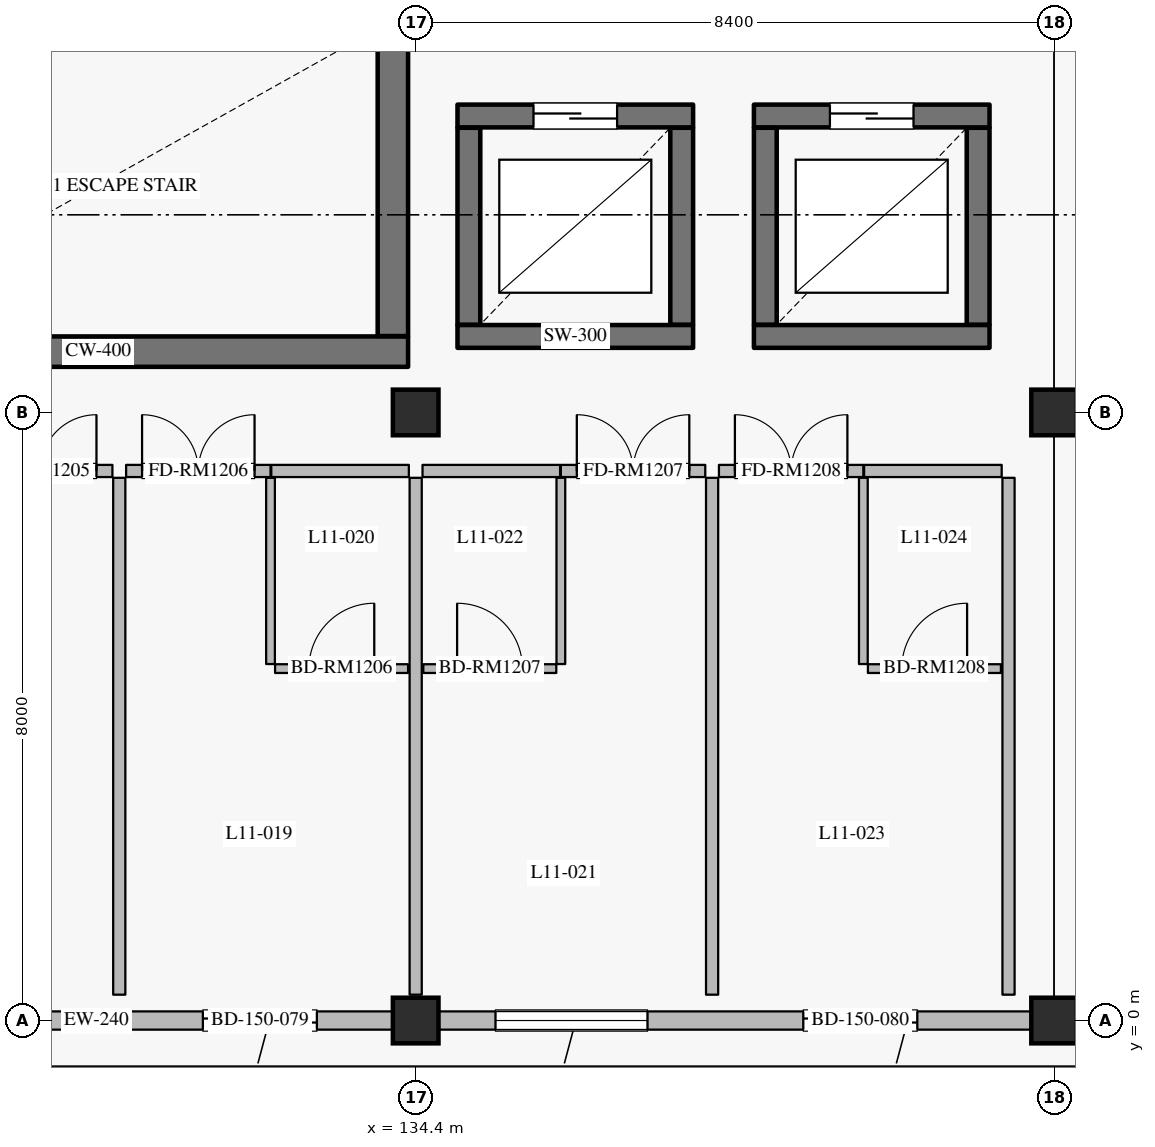
"""IFC4 building model, lengths in metres.
Left out: names, types, materials, properties, quantities, classifications, styles, units other than length and angle.
Written with IfcOpenShell. Run it as: python <this file> out.ifc"""

import sys

from ifc_helpers import new_model, si_unit, direction, frame, frame_2d, origin, origin_2d, place, context, subcontext, project, spatial, rectangle, extrude, element, fill, save


model = new_model("IFC4")
c1 = context("Model", 3, precision=1e-05, world=origin(), true_north=direction((0.0, 1.0)))
c2 = subcontext(c1, "Body", "Model", "MODEL_VIEW")
j1 = project(units=[si_unit("LENGTHUNIT", "METRE"), si_unit("PLANEANGLEUNIT", "RADIAN")], contexts=[c1])
p1 = place(None, origin())
s1 = spatial("IfcSite", under=j1, at=p1, CompositionType="ELEMENT")
p2 = place(p1, origin())
s2 = spatial("IfcBuilding", under=s1, at=p2, CompositionType="ELEMENT")
p3 = place(p2, frame((0.0, 0.0, 47.4)))
s3 = spatial("IfcBuildingStorey", under=s2, at=p3, CompositionType="ELEMENT", Elevation=47.4)
for number, where, z_axis, x_axis in (
    (1, (134.4, 0.0, 0.0), (0.0, 0.0, 1.0), (1.0, 0.0, 0.0)),
    (2, (142.8, 0.0, 0.0), (0.0, 0.0, 1.0), (1.0, 0.0, 0.0)),
    (3, (134.4, 8.0, 0.0), (0.0, 0.0, 1.0), (1.0, 0.0, 0.0)),
    (4, (142.8, 8.0, 0.0), (0.0, 0.0, 1.0), (1.0, 0.0, 0.0)),
):
    element("IfcColumn", number, at=place(p3, frame(where, z_axis=z_axis, x_axis=x_axis)), inside=s3, PredefinedType="COLUMN", context=c2, shape_type="SweptSolid", body=[
        extrude(rectangle(XDim=0.6, YDim=0.6, at=origin_2d()), origin(), (0.0, 0.0, 1.0), 4.2),
    ])
p4 = place(p3, frame((134.1, 0.0, 0.0), z_axis=(0.0, 0.0, 1.0), x_axis=(-1.0, 0.0, 0.0)))
e5 = element("IfcWall", 5, at=p4, inside=s3, PredefinedType="SOLIDWALL", context=c2, shape_type="SweptSolid", body=[
    extrude(rectangle(XDim=7.8, YDim=0.24, at=frame_2d((3.9, 0.0))), origin(), (0.0, 0.0, 1.0), 3.49),
])
p5 = place(p4, frame((1.0, 0.0, 0.0)))
e6 = element("IfcOpeningElement", 6, at=p5, cuts=e5, PredefinedType="OPENING", context=c2, shape_type="SweptSolid", body=[
    extrude(rectangle(XDim=1.5, YDim=2.25, at=frame_2d((0.75, 1.125))), frame((0.0, 0.13, 0.0), z_axis=(0.0, -1.0, 0.0), x_axis=(1.0, 0.0, 0.0)), (0.0, 0.0, 1.0), 0.26),
])
p6 = place(p4, frame((4.55, 0.0, 0.8)))
e7 = element("IfcOpeningElement", 7, at=p6, cuts=e5, PredefinedType="OPENING", context=c2, shape_type="SweptSolid", body=[
    extrude(rectangle(XDim=2.0, YDim=1.75, at=frame_2d((1.0, 0.875))), frame((0.0, 0.13, 0.0), z_axis=(0.0, -1.0, 0.0), x_axis=(1.0, 0.0, 0.0)), (0.0, 0.0, 1.0), 0.26),
])
p7 = place(p3, frame((142.5, 0.0, 0.0), z_axis=(0.0, 0.0, 1.0), x_axis=(-1.0, 0.0, 0.0)))
e8 = element("IfcWall", 8, at=p7, inside=s3, PredefinedType="SOLIDWALL", context=c2, shape_type="SweptSolid", body=[
    extrude(rectangle(XDim=7.8, YDim=0.24, at=frame_2d((3.9, 0.0))), origin(), (0.0, 0.0, 1.0), 3.49),
])
p8 = place(p7, frame((1.5, 0.0, 0.0)))
e9 = element("IfcOpeningElement", 9, at=p8, cuts=e8, PredefinedType="OPENING", context=c2, shape_type="SweptSolid", body=[
    extrude(rectangle(XDim=1.5, YDim=2.25, at=frame_2d((0.75, 1.125))), frame((0.0, 0.13, 0.0), z_axis=(0.0, -1.0, 0.0), x_axis=(1.0, 0.0, 0.0)), (0.0, 0.0, 1.0), 0.26),
])
p9 = place(p7, frame((5.05, 0.0, 0.8)))
e10 = element("IfcOpeningElement", 10, at=p9, cuts=e8, PredefinedType="OPENING", context=c2, shape_type="SweptSolid", body=[
    extrude(rectangle(XDim=2.0, YDim=1.75, at=frame_2d((1.0, 0.875))), frame((0.0, 0.13, 0.0), z_axis=(0.0, -1.0, 0.0), x_axis=(1.0, 0.0, 0.0)), (0.0, 0.0, 1.0), 0.26),
])
p10 = place(p3, frame((134.95, 9.0, 0.0), z_axis=(0.0, 0.0, 1.0), x_axis=(1.0, 0.0, 0.0)))
e11 = element("IfcWall", 11, at=p10, inside=s3, PredefinedType="SHEAR", context=c2, shape_type="SweptSolid", body=[
    extrude(rectangle(XDim=3.1, YDim=0.3, at=frame_2d((1.55, 0.0))), origin(), (0.0, 0.0, 1.0), 3.935),
])
p11 = place(p3, frame((137.9, 9.155, 0.0), z_axis=(0.0, 0.0, 1.0), x_axis=(0.0, 1.0, 0.0)))
e12 = element("IfcWall", 12, at=p11, inside=s3, PredefinedType="SHEAR", context=c2, shape_type="SweptSolid", body=[
    extrude(rectangle(XDim=2.59, YDim=0.3, at=frame_2d((1.295, 0.0))), origin(), (0.0, 0.0, 1.0), 3.935),
])
p12 = place(p3, frame((138.05, 11.9, 0.0), z_axis=(0.0, 0.0, 1.0), x_axis=(-1.0, 0.0, 0.0)))
e13 = element("IfcWall", 13, at=p12, inside=s3, PredefinedType="SHEAR", context=c2, shape_type="SweptSolid", body=[
    extrude(rectangle(XDim=3.1, YDim=0.3, at=frame_2d((1.55, 0.0))), origin(), (0.0, 0.0, 1.0), 3.935),
])
p13 = place(p12, frame((1.0, 0.0, 0.0)))
e14 = element("IfcOpeningElement", 14, at=p13, cuts=e13, PredefinedType="OPENING", context=c2, shape_type="SweptSolid", body=[
    extrude(rectangle(XDim=1.1, YDim=2.2, at=frame_2d((0.55, 1.1))), frame((0.0, 0.16, 0.0), z_axis=(0.0, -1.0, 0.0), x_axis=(1.0, 0.0, 0.0)), (0.0, 0.0, 1.0), 0.32),
])
p14 = place(p3, frame((135.1, 11.745, 0.0), z_axis=(0.0, 0.0, 1.0), x_axis=(0.0, -1.0, 0.0)))
e15 = element("IfcWall", 15, at=p14, inside=s3, PredefinedType="SHEAR", context=c2, shape_type="SweptSolid", body=[
    extrude(rectangle(XDim=2.59, YDim=0.3, at=frame_2d((1.295, 0.0))), origin(), (0.0, 0.0, 1.0), 3.935),
])
p15 = place(p3, frame((138.85, 9.0, 0.0), z_axis=(0.0, 0.0, 1.0), x_axis=(1.0, 0.0, 0.0)))
e16 = element("IfcWall", 16, at=p15, inside=s3, PredefinedType="SHEAR", context=c2, shape_type="SweptSolid", body=[
    extrude(rectangle(XDim=3.1, YDim=0.3, at=frame_2d((1.55, 0.0))), origin(), (0.0, 0.0, 1.0), 3.935),
])
p16 = place(p3, frame((141.8, 9.155, 0.0), z_axis=(0.0, 0.0, 1.0), x_axis=(0.0, 1.0, 0.0)))
e17 = element("IfcWall", 17, at=p16, inside=s3, PredefinedType="SHEAR", context=c2, shape_type="SweptSolid", body=[
    extrude(rectangle(XDim=2.59, YDim=0.3, at=frame_2d((1.295, 0.0))), origin(), (0.0, 0.0, 1.0), 3.935),
])
p17 = place(p3, frame((141.95, 11.9, 0.0), z_axis=(0.0, 0.0, 1.0), x_axis=(-1.0, 0.0, 0.0)))
e18 = element("IfcWall", 18, at=p17, inside=s3, PredefinedType="SHEAR", context=c2, shape_type="SweptSolid", body=[
    extrude(rectangle(XDim=3.1, YDim=0.3, at=frame_2d((1.55, 0.0))), origin(), (0.0, 0.0, 1.0), 3.935),
])
p18 = place(p17, frame((1.0, 0.0, 0.0)))
e19 = element("IfcOpeningElement", 19, at=p18, cuts=e18, PredefinedType="OPENING", context=c2, shape_type="SweptSolid", body=[
    extrude(rectangle(XDim=1.1, YDim=2.2, at=frame_2d((0.55, 1.1))), frame((0.0, 0.16, 0.0), z_axis=(0.0, -1.0, 0.0), x_axis=(1.0, 0.0, 0.0)), (0.0, 0.0, 1.0), 0.32),
])
p19 = place(p3, frame((139.0, 11.745, 0.0), z_axis=(0.0, 0.0, 1.0), x_axis=(0.0, -1.0, 0.0)))
e20 = element("IfcWall", 20, at=p19, inside=s3, PredefinedType="SHEAR", context=c2, shape_type="SweptSolid", body=[
    extrude(rectangle(XDim=2.59, YDim=0.3, at=frame_2d((1.295, 0.0))), origin(), (0.0, 0.0, 1.0), 3.935),
])
p20 = place(p3, frame((126.15, 8.8, 0.0), z_axis=(0.0, 0.0, 1.0), x_axis=(1.0, 0.0, 0.0)))
e21 = element("IfcWall", 21, at=p20, inside=s3, PredefinedType="SHEAR", context=c2, shape_type="SweptSolid", body=[
    extrude(rectangle(XDim=8.15, YDim=0.4, at=frame_2d((4.075, 0.0))), origin(), (0.0, 0.0, 1.0), 3.935),
])
p21 = place(p3, frame((134.1, 9.005, 0.0), z_axis=(0.0, 0.0, 1.0), x_axis=(0.0, 1.0, 0.0)))
e22 = element("IfcWall", 22, at=p21, inside=s3, PredefinedType="SHEAR", context=c2, shape_type="SweptSolid", body=[
    extrude(rectangle(XDim=3.95, YDim=0.4, at=frame_2d((1.975, 0.0))), origin(), (0.0, 0.0, 1.0), 3.935),
])
p22 = place(p3, frame((128.51, 7.23, 0.0), z_axis=(0.0, 0.0, 1.0), x_axis=(1.0, 0.0, 0.0)))
e23 = element("IfcWall", 23, at=p22, inside=s3, PredefinedType="PARTITIONING", context=c2, shape_type="SweptSolid", body=[
    extrude(rectangle(XDim=1.9, YDim=0.16, at=frame_2d((0.95, 0.0))), origin(), (0.0, 0.0, 1.0), 3.935),
])
p23 = place(p22, frame((0.21, 0.0, 0.0)))
e24 = element("IfcOpeningElement", 24, at=p23, cuts=e23, PredefinedType="OPENING", context=c2, shape_type="SweptSolid", body=[
    extrude(rectangle(XDim=1.48, YDim=2.35, at=frame_2d((0.74, 1.175))), frame((0.0, 0.09, 0.0), z_axis=(0.0, -1.0, 0.0), x_axis=(1.0, 0.0, 0.0)), (0.0, 0.0, 1.0), 0.18),
])
p24 = place(p3, frame((130.59, 7.23, 0.0), z_axis=(0.0, 0.0, 1.0), x_axis=(1.0, 0.0, 0.0)))
e25 = element("IfcWall", 25, at=p24, inside=s3, PredefinedType="PARTITIONING", context=c2, shape_type="SweptSolid", body=[
    extrude(rectangle(XDim=1.9, YDim=0.16, at=frame_2d((0.95, 0.0))), origin(), (0.0, 0.0, 1.0), 3.935),
])
p25 = place(p24, frame((0.21, 0.0, 0.0)))
e26 = element("IfcOpeningElement", 26, at=p25, cuts=e25, PredefinedType="OPENING", context=c2, shape_type="SweptSolid", body=[
    extrude(rectangle(XDim=1.48, YDim=2.35, at=frame_2d((0.74, 1.175))), frame((0.0, 0.09, 0.0), z_axis=(0.0, -1.0, 0.0), x_axis=(1.0, 0.0, 0.0)), (0.0, 0.0, 1.0), 0.18),
])
p26 = place(p3, frame((132.5, 7.23, 0.0), z_axis=(0.0, 0.0, 1.0), x_axis=(1.0, 0.0, 0.0)))
e27 = element("IfcWall", 27, at=p26, inside=s3, PredefinedType="PARTITIONING", context=c2, shape_type="SweptSolid", body=[
    extrude(rectangle(XDim=1.81, YDim=0.16, at=frame_2d((0.905, 0.0))), origin(), (0.0, 0.0, 1.0), 3.935),
])
p27 = place(p3, frame((132.49, 4.69, 0.0), z_axis=(0.0, 0.0, 1.0), x_axis=(0.0, 1.0, 0.0)))
e28 = element("IfcWall", 28, at=p27, inside=s3, PredefinedType="PARTITIONING", context=c2, shape_type="SweptSolid", body=[
    extrude(rectangle(XDim=2.45, YDim=0.115, at=frame_2d((1.225, 0.0))), origin(), (0.0, 0.0, 1.0), 3.935),
])
p28 = place(p3, frame((132.55, 4.63, 0.0), z_axis=(0.0, 0.0, 1.0), x_axis=(1.0, 0.0, 0.0)))
e29 = element("IfcWall", 29, at=p28, inside=s3, PredefinedType="PARTITIONING", context=c2, shape_type="SweptSolid", body=[
    extrude(rectangle(XDim=1.75, YDim=0.115, at=frame_2d((0.875, 0.0))), origin(), (0.0, 0.0, 1.0), 3.935),
])
p29 = place(p28, frame((0.445, 0.0, 0.0)))
e30 = element("IfcOpeningElement", 30, at=p29, cuts=e29, PredefinedType="OPENING", context=c2, shape_type="SweptSolid", body=[
    extrude(rectangle(XDim=0.86, YDim=2.12, at=frame_2d((0.43, 1.06))), frame((0.0, 0.067, 0.0), z_axis=(0.0, -1.0, 0.0), x_axis=(1.0, 0.0, 0.0)), (0.0, 0.0, 1.0), 0.135),
])
p30 = place(p3, frame((130.5, 0.34, 0.0), z_axis=(0.0, 0.0, 1.0), x_axis=(0.0, 1.0, 0.0)))
e31 = element("IfcWall", 31, at=p30, inside=s3, PredefinedType="PARTITIONING", context=c2, shape_type="SweptSolid", body=[
    extrude(rectangle(XDim=6.8, YDim=0.16, at=frame_2d((3.4, 0.0))), origin(), (0.0, 0.0, 1.0), 3.935),
])
p31 = place(p3, frame((134.49, 7.23, 0.0), z_axis=(0.0, 0.0, 1.0), x_axis=(1.0, 0.0, 0.0)))
e32 = element("IfcWall", 32, at=p31, inside=s3, PredefinedType="PARTITIONING", context=c2, shape_type="SweptSolid", body=[
    extrude(rectangle(XDim=1.81, YDim=0.16, at=frame_2d((0.905, 0.0))), origin(), (0.0, 0.0, 1.0), 3.935),
])
p32 = place(p3, frame((136.31, 7.23, 0.0), z_axis=(0.0, 0.0, 1.0), x_axis=(1.0, 0.0, 0.0)))
e33 = element("IfcWall", 33, at=p32, inside=s3, PredefinedType="PARTITIONING", context=c2, shape_type="SweptSolid", body=[
    extrude(rectangle(XDim=1.9, YDim=0.16, at=frame_2d((0.95, 0.0))), origin(), (0.0, 0.0, 1.0), 3.935),
])
p33 = place(p32, frame((0.21, 0.0, 0.0)))
e34 = element("IfcOpeningElement", 34, at=p33, cuts=e33, PredefinedType="OPENING", context=c2, shape_type="SweptSolid", body=[
    extrude(rectangle(XDim=1.48, YDim=2.35, at=frame_2d((0.74, 1.175))), frame((0.0, 0.09, 0.0), z_axis=(0.0, -1.0, 0.0), x_axis=(1.0, 0.0, 0.0)), (0.0, 0.0, 1.0), 0.18),
])
p34 = place(p3, frame((136.31, 4.69, 0.0), z_axis=(0.0, 0.0, 1.0), x_axis=(0.0, 1.0, 0.0)))
e35 = element("IfcWall", 35, at=p34, inside=s3, PredefinedType="PARTITIONING", context=c2, shape_type="SweptSolid", body=[
    extrude(rectangle(XDim=2.45, YDim=0.115, at=frame_2d((1.225, 0.0))), origin(), (0.0, 0.0, 1.0), 3.935),
])
p35 = place(p3, frame((134.5, 4.63, 0.0), z_axis=(0.0, 0.0, 1.0), x_axis=(1.0, 0.0, 0.0)))
e36 = element("IfcWall", 36, at=p35, inside=s3, PredefinedType="PARTITIONING", context=c2, shape_type="SweptSolid", body=[
    extrude(rectangle(XDim=1.75, YDim=0.115, at=frame_2d((0.875, 0.0))), origin(), (0.0, 0.0, 1.0), 3.935),
])
p36 = place(p35, frame((0.445, 0.0, 0.0)))
e37 = element("IfcOpeningElement", 37, at=p36, cuts=e36, PredefinedType="OPENING", context=c2, shape_type="SweptSolid", body=[
    extrude(rectangle(XDim=0.86, YDim=2.12, at=frame_2d((0.43, 1.06))), frame((0.0, 0.067, 0.0), z_axis=(0.0, -1.0, 0.0), x_axis=(1.0, 0.0, 0.0)), (0.0, 0.0, 1.0), 0.135),
])
p37 = place(p3, frame((134.4, 0.34, 0.0), z_axis=(0.0, 0.0, 1.0), x_axis=(0.0, 1.0, 0.0)))
e38 = element("IfcWall", 38, at=p37, inside=s3, PredefinedType="PARTITIONING", context=c2, shape_type="SweptSolid", body=[
    extrude(rectangle(XDim=6.8, YDim=0.16, at=frame_2d((3.4, 0.0))), origin(), (0.0, 0.0, 1.0), 3.29),
])
p38 = place(p3, frame((138.39, 7.23, 0.0), z_axis=(0.0, 0.0, 1.0), x_axis=(1.0, 0.0, 0.0)))
e39 = element("IfcWall", 39, at=p38, inside=s3, PredefinedType="PARTITIONING", context=c2, shape_type="SweptSolid", body=[
    extrude(rectangle(XDim=1.9, YDim=0.16, at=frame_2d((0.95, 0.0))), origin(), (0.0, 0.0, 1.0), 3.935),
])
p39 = place(p38, frame((0.21, 0.0, 0.0)))
e40 = element("IfcOpeningElement", 40, at=p39, cuts=e39, PredefinedType="OPENING", context=c2, shape_type="SweptSolid", body=[
    extrude(rectangle(XDim=1.48, YDim=2.35, at=frame_2d((0.74, 1.175))), frame((0.0, 0.09, 0.0), z_axis=(0.0, -1.0, 0.0), x_axis=(1.0, 0.0, 0.0)), (0.0, 0.0, 1.0), 0.18),
])
p40 = place(p3, frame((140.3, 7.23, 0.0), z_axis=(0.0, 0.0, 1.0), x_axis=(1.0, 0.0, 0.0)))
e41 = element("IfcWall", 41, at=p40, inside=s3, PredefinedType="PARTITIONING", context=c2, shape_type="SweptSolid", body=[
    extrude(rectangle(XDim=1.81, YDim=0.16, at=frame_2d((0.905, 0.0))), origin(), (0.0, 0.0, 1.0), 3.935),
])
p41 = place(p3, frame((140.29, 4.69, 0.0), z_axis=(0.0, 0.0, 1.0), x_axis=(0.0, 1.0, 0.0)))
e42 = element("IfcWall", 42, at=p41, inside=s3, PredefinedType="PARTITIONING", context=c2, shape_type="SweptSolid", body=[
    extrude(rectangle(XDim=2.45, YDim=0.115, at=frame_2d((1.225, 0.0))), origin(), (0.0, 0.0, 1.0), 3.935),
])
p42 = place(p3, frame((140.35, 4.63, 0.0), z_axis=(0.0, 0.0, 1.0), x_axis=(1.0, 0.0, 0.0)))
e43 = element("IfcWall", 43, at=p42, inside=s3, PredefinedType="PARTITIONING", context=c2, shape_type="SweptSolid", body=[
    extrude(rectangle(XDim=1.75, YDim=0.115, at=frame_2d((0.875, 0.0))), origin(), (0.0, 0.0, 1.0), 3.935),
])
p43 = place(p42, frame((0.445, 0.0, 0.0)))
e44 = element("IfcOpeningElement", 44, at=p43, cuts=e43, PredefinedType="OPENING", context=c2, shape_type="SweptSolid", body=[
    extrude(rectangle(XDim=0.86, YDim=2.12, at=frame_2d((0.43, 1.06))), frame((0.0, 0.067, 0.0), z_axis=(0.0, -1.0, 0.0), x_axis=(1.0, 0.0, 0.0)), (0.0, 0.0, 1.0), 0.135),
])
for number, where, z_axis, x_axis in (
    (45, (138.3, 0.34, 0.0), (0.0, 0.0, 1.0), (0.0, 1.0, 0.0)),
    (46, (142.2, 0.34, 0.0), (0.0, 0.0, 1.0), (0.0, 1.0, 0.0)),
):
    element("IfcWall", number, at=place(p3, frame(where, z_axis=z_axis, x_axis=x_axis)), inside=s3, PredefinedType="PARTITIONING", context=c2, shape_type="SweptSolid", body=[
        extrude(rectangle(XDim=6.8, YDim=0.16, at=frame_2d((3.4, 0.0))), origin(), (0.0, 0.0, 1.0), 3.935),
    ])
p44 = place(p5, origin())
e47 = element("IfcDoor", 47, at=p44, inside=s3, OperationType="SLIDING_TO_LEFT", PredefinedType="DOOR", context=c2, shape_type="SweptSolid", body=[
    extrude(rectangle(XDim=1.5, YDim=2.25, at=frame_2d((0.75, 1.125))), frame((0.0, 0.025, 0.0), z_axis=(0.0, -1.0, 0.0), x_axis=(1.0, 0.0, 0.0)), (0.0, 0.0, 1.0), 0.05),
])
fill(e6, e47)
p45 = place(p8, origin())
e48 = element("IfcDoor", 48, at=p45, inside=s3, OperationType="SLIDING_TO_LEFT", PredefinedType="DOOR", context=c2, shape_type="SweptSolid", body=[
    extrude(rectangle(XDim=1.5, YDim=2.25, at=frame_2d((0.75, 1.125))), frame((0.0, 0.025, 0.0), z_axis=(0.0, -1.0, 0.0), x_axis=(1.0, 0.0, 0.0)), (0.0, 0.0, 1.0), 0.05),
])
fill(e9, e48)
p46 = place(p9, origin())
e49 = element("IfcWindow", 49, at=p46, inside=s3, PartitioningType="DOUBLE_PANEL_VERTICAL", PredefinedType="WINDOW", context=c2, shape_type="SweptSolid", body=[
    extrude(rectangle(XDim=2.0, YDim=1.75, at=frame_2d((1.0, 0.875))), frame((0.0, 0.03, 0.0), z_axis=(0.0, -1.0, 0.0), x_axis=(1.0, 0.0, 0.0)), (0.0, 0.0, 1.0), 0.06),
])
fill(e10, e49)
p47 = place(p13, origin())
e50 = element("IfcDoor", 50, at=p47, inside=s3, OperationType="DOUBLE_DOOR_SLIDING", PredefinedType="DOOR", context=c2, shape_type="SweptSolid", body=[
    extrude(rectangle(XDim=1.1, YDim=2.2, at=frame_2d((0.55, 1.1))), frame((0.0, 0.025, 0.0), z_axis=(0.0, -1.0, 0.0), x_axis=(1.0, 0.0, 0.0)), (0.0, 0.0, 1.0), 0.05),
])
fill(e14, e50)
p48 = place(p18, origin())
e51 = element("IfcDoor", 51, at=p48, inside=s3, OperationType="DOUBLE_DOOR_SLIDING", PredefinedType="DOOR", context=c2, shape_type="SweptSolid", body=[
    extrude(rectangle(XDim=1.1, YDim=2.2, at=frame_2d((0.55, 1.1))), frame((0.0, 0.025, 0.0), z_axis=(0.0, -1.0, 0.0), x_axis=(1.0, 0.0, 0.0)), (0.0, 0.0, 1.0), 0.05),
])
fill(e19, e51)
p49 = place(p23, origin())
e52 = element("IfcDoor", 52, at=p49, inside=s3, OperationType="DOUBLE_DOOR_SINGLE_SWING", PredefinedType="DOOR", context=c2, shape_type="SweptSolid", body=[
    extrude(rectangle(XDim=1.48, YDim=2.35, at=frame_2d((0.74, 1.175))), frame((0.0, 0.025, 0.0), z_axis=(0.0, -1.0, 0.0), x_axis=(1.0, 0.0, 0.0)), (0.0, 0.0, 1.0), 0.05),
])
fill(e24, e52)
p50 = place(p25, origin())
e53 = element("IfcDoor", 53, at=p50, inside=s3, OperationType="DOUBLE_DOOR_SINGLE_SWING", PredefinedType="DOOR", context=c2, shape_type="SweptSolid", body=[
    extrude(rectangle(XDim=1.48, YDim=2.35, at=frame_2d((0.74, 1.175))), frame((0.0, 0.025, 0.0), z_axis=(0.0, -1.0, 0.0), x_axis=(1.0, 0.0, 0.0)), (0.0, 0.0, 1.0), 0.05),
])
fill(e26, e53)
p51 = place(p29, origin())
e54 = element("IfcDoor", 54, at=p51, inside=s3, OperationType="SINGLE_SWING_RIGHT", PredefinedType="DOOR", context=c2, shape_type="SweptSolid", body=[
    extrude(rectangle(XDim=0.86, YDim=2.12, at=frame_2d((0.43, 1.06))), frame((0.0, 0.025, 0.0), z_axis=(0.0, -1.0, 0.0), x_axis=(1.0, 0.0, 0.0)), (0.0, 0.0, 1.0), 0.05),
])
fill(e30, e54)
p52 = place(p33, origin())
e55 = element("IfcDoor", 55, at=p52, inside=s3, OperationType="DOUBLE_DOOR_SINGLE_SWING", PredefinedType="DOOR", context=c2, shape_type="SweptSolid", body=[
    extrude(rectangle(XDim=1.48, YDim=2.35, at=frame_2d((0.74, 1.175))), frame((0.0, 0.025, 0.0), z_axis=(0.0, -1.0, 0.0), x_axis=(1.0, 0.0, 0.0)), (0.0, 0.0, 1.0), 0.05),
])
fill(e34, e55)
p53 = place(p36, origin())
e56 = element("IfcDoor", 56, at=p53, inside=s3, OperationType="SINGLE_SWING_LEFT", PredefinedType="DOOR", context=c2, shape_type="SweptSolid", body=[
    extrude(rectangle(XDim=0.86, YDim=2.12, at=frame_2d((0.43, 1.06))), frame((0.0, 0.025, 0.0), z_axis=(0.0, -1.0, 0.0), x_axis=(1.0, 0.0, 0.0)), (0.0, 0.0, 1.0), 0.05),
])
fill(e37, e56)
p54 = place(p39, origin())
e57 = element("IfcDoor", 57, at=p54, inside=s3, OperationType="DOUBLE_DOOR_SINGLE_SWING", PredefinedType="DOOR", context=c2, shape_type="SweptSolid", body=[
    extrude(rectangle(XDim=1.48, YDim=2.35, at=frame_2d((0.74, 1.175))), frame((0.0, 0.025, 0.0), z_axis=(0.0, -1.0, 0.0), x_axis=(1.0, 0.0, 0.0)), (0.0, 0.0, 1.0), 0.05),
])
fill(e40, e57)
p55 = place(p43, origin())
e58 = element("IfcDoor", 58, at=p55, inside=s3, OperationType="SINGLE_SWING_RIGHT", PredefinedType="DOOR", context=c2, shape_type="SweptSolid", body=[
    extrude(rectangle(XDim=0.86, YDim=2.12, at=frame_2d((0.43, 1.06))), frame((0.0, 0.025, 0.0), z_axis=(0.0, -1.0, 0.0), x_axis=(1.0, 0.0, 0.0)), (0.0, 0.0, 1.0), 0.05),
])
fill(e44, e58)
save(model, sys.argv[1])
